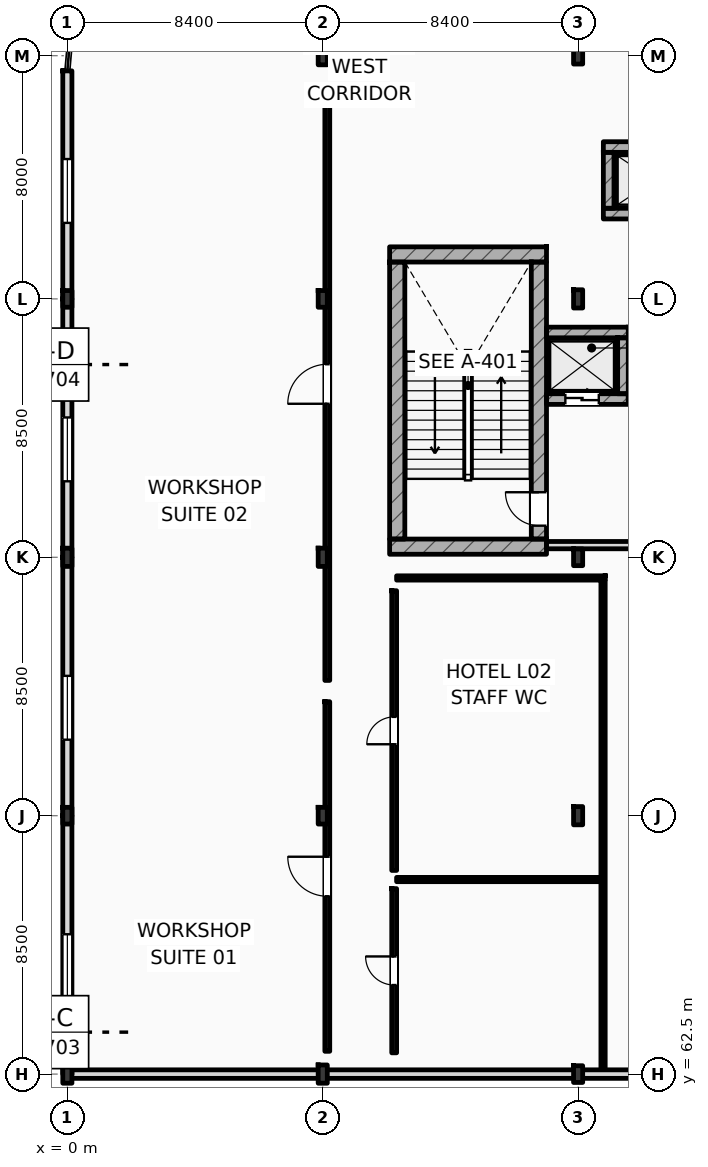
"""IFC4 building model, lengths in metres.
Left out: names, types, materials, properties, quantities, classifications, styles, units other than length and angle.
Written with IfcOpenShell. Run it as: python <this file> out.ifc"""

import sys

from ifc_helpers import new_model, si_unit, direction, frame, frame_2d, origin, origin_2d, place, context, subcontext, project, spatial, rectangle, i_section, extrude, element, fill, save


model = new_model("IFC4")
c1 = context("Model", 3, precision=1e-05, world=origin(), true_north=direction((0.0, 1.0)))
c2 = subcontext(c1, "Body", "Model", "MODEL_VIEW")
j1 = project(units=[si_unit("LENGTHUNIT", "METRE"), si_unit("PLANEANGLEUNIT", "RADIAN")], contexts=[c1])
p1 = place(None, origin())
s1 = spatial("IfcSite", under=j1, at=p1, CompositionType="ELEMENT")
p2 = place(p1, origin())
s2 = spatial("IfcBuilding", under=s1, at=p2, CompositionType="ELEMENT")
p3 = place(p2, frame((0.0, 0.0, 11.4)))
s3 = spatial("IfcBuildingStorey", under=s2, at=p3, CompositionType="ELEMENT", Elevation=11.4)
p4 = place(p3, frame((0.0, 62.5, 0.0), z_axis=(0.0, 0.0, 1.0), x_axis=(1.0, 0.0, 0.0)))
e1 = element("IfcColumn", 1, at=p4, inside=s3, PredefinedType="COLUMN", context=c2, shape_type="SweptSolid", body=[
    extrude(i_section(OverallWidth=0.3, OverallDepth=0.6, WebThickness=0.015, FlangeThickness=0.03, FilletRadius=0.027, at=origin_2d()), origin(), (0.0, 0.0, 1.0), 4.8),
])
p5 = place(p3, frame((0.0, 71.0, 0.0), z_axis=(0.0, 0.0, 1.0), x_axis=(1.0, 0.0, 0.0)))
e2 = element("IfcColumn", 2, at=p5, inside=s3, PredefinedType="COLUMN", context=c2, shape_type="SweptSolid", body=[
    extrude(i_section(OverallWidth=0.3, OverallDepth=0.55, WebThickness=0.015, FlangeThickness=0.029, FilletRadius=0.027, at=origin_2d()), origin(), (0.0, 0.0, 1.0), 4.8),
])
p6 = place(p3, frame((0.0, 79.5, 0.0), z_axis=(0.0, 0.0, 1.0), x_axis=(1.0, 0.0, 0.0)))
e3 = element("IfcColumn", 3, at=p6, inside=s3, PredefinedType="COLUMN", context=c2, shape_type="SweptSolid", body=[
    extrude(i_section(OverallWidth=0.3, OverallDepth=0.6, WebThickness=0.015, FlangeThickness=0.03, FilletRadius=0.027, at=origin_2d()), origin(), (0.0, 0.0, 1.0), 4.8),
])
p7 = place(p3, frame((0.0, 88.0, 0.0), z_axis=(0.0, 0.0, 1.0), x_axis=(1.0, 0.0, 0.0)))
e4 = element("IfcColumn", 4, at=p7, inside=s3, PredefinedType="COLUMN", context=c2, shape_type="SweptSolid", body=[
    extrude(i_section(OverallWidth=0.3, OverallDepth=0.55, WebThickness=0.015, FlangeThickness=0.029, FilletRadius=0.027, at=origin_2d()), origin(), (0.0, 0.0, 1.0), 4.8),
])
p8 = place(p3, frame((8.4, 62.5, 0.0), z_axis=(0.0, 0.0, 1.0), x_axis=(1.0, 0.0, 0.0)))
e5 = element("IfcColumn", 5, at=p8, inside=s3, PredefinedType="COLUMN", context=c2, shape_type="SweptSolid", body=[
    extrude(i_section(OverallWidth=0.3, OverallDepth=0.6, WebThickness=0.015, FlangeThickness=0.03, FilletRadius=0.027, at=origin_2d()), origin(), (0.0, 0.0, 1.0), 4.8),
])
p9 = place(p3, frame((8.4, 71.0, 0.0), z_axis=(0.0, 0.0, 1.0), x_axis=(1.0, 0.0, 0.0)))
e6 = element("IfcColumn", 6, at=p9, inside=s3, PredefinedType="COLUMN", context=c2, shape_type="SweptSolid", body=[
    extrude(i_section(OverallWidth=0.3, OverallDepth=0.55, WebThickness=0.015, FlangeThickness=0.029, FilletRadius=0.027, at=origin_2d()), origin(), (0.0, 0.0, 1.0), 4.8),
])
p10 = place(p3, frame((8.4, 79.5, 0.0), z_axis=(0.0, 0.0, 1.0), x_axis=(1.0, 0.0, 0.0)))
e7 = element("IfcColumn", 7, at=p10, inside=s3, PredefinedType="COLUMN", context=c2, shape_type="SweptSolid", body=[
    extrude(i_section(OverallWidth=0.3, OverallDepth=0.6, WebThickness=0.015, FlangeThickness=0.03, FilletRadius=0.027, at=origin_2d()), origin(), (0.0, 0.0, 1.0), 4.8),
])
p11 = place(p3, frame((8.4, 88.0, 0.0), z_axis=(0.0, 0.0, 1.0), x_axis=(1.0, 0.0, 0.0)))
e8 = element("IfcColumn", 8, at=p11, inside=s3, PredefinedType="COLUMN", context=c2, shape_type="SweptSolid", body=[
    extrude(i_section(OverallWidth=0.3, OverallDepth=0.55, WebThickness=0.015, FlangeThickness=0.029, FilletRadius=0.027, at=origin_2d()), origin(), (0.0, 0.0, 1.0), 4.8),
])
p12 = place(p3, frame((8.4, 96.0, 0.0), z_axis=(0.0, 0.0, 1.0), x_axis=(1.0, 0.0, 0.0)))
e9 = element("IfcColumn", 9, at=p12, inside=s3, PredefinedType="COLUMN", context=c2, shape_type="SweptSolid", body=[
    extrude(i_section(OverallWidth=0.3, OverallDepth=0.6, WebThickness=0.015, FlangeThickness=0.03, FilletRadius=0.027, at=origin_2d()), origin(), (0.0, 0.0, 1.0), 4.8),
])
p13 = place(p3, frame((16.8, 62.5, 0.0), z_axis=(0.0, 0.0, 1.0), x_axis=(1.0, 0.0, 0.0)))
e10 = element("IfcColumn", 10, at=p13, inside=s3, PredefinedType="COLUMN", context=c2, shape_type="SweptSolid", body=[
    extrude(i_section(OverallWidth=0.3, OverallDepth=0.55, WebThickness=0.015, FlangeThickness=0.029, FilletRadius=0.027, at=origin_2d()), origin(), (0.0, 0.0, 1.0), 4.8),
])
p14 = place(p3, frame((16.8, 71.0, 0.0), z_axis=(0.0, 0.0, 1.0), x_axis=(1.0, 0.0, 0.0)))
e11 = element("IfcColumn", 11, at=p14, inside=s3, PredefinedType="COLUMN", context=c2, shape_type="SweptSolid", body=[
    extrude(i_section(OverallWidth=0.3, OverallDepth=0.6, WebThickness=0.015, FlangeThickness=0.03, FilletRadius=0.027, at=origin_2d()), origin(), (0.0, 0.0, 1.0), 4.8),
])
p15 = place(p3, frame((16.8, 79.5, 0.0), z_axis=(0.0, 0.0, 1.0), x_axis=(1.0, 0.0, 0.0)))
e12 = element("IfcColumn", 12, at=p15, inside=s3, PredefinedType="COLUMN", context=c2, shape_type="SweptSolid", body=[
    extrude(i_section(OverallWidth=0.3, OverallDepth=0.55, WebThickness=0.015, FlangeThickness=0.029, FilletRadius=0.027, at=origin_2d()), origin(), (0.0, 0.0, 1.0), 4.8),
])
p16 = place(p3, frame((16.8, 88.0, 0.0), z_axis=(0.0, 0.0, 1.0), x_axis=(1.0, 0.0, 0.0)))
e13 = element("IfcColumn", 13, at=p16, inside=s3, PredefinedType="COLUMN", context=c2, shape_type="SweptSolid", body=[
    extrude(i_section(OverallWidth=0.3, OverallDepth=0.6, WebThickness=0.015, FlangeThickness=0.03, FilletRadius=0.027, at=origin_2d()), origin(), (0.0, 0.0, 1.0), 4.8),
])
p17 = place(p3, frame((16.8, 96.0, 0.0), z_axis=(0.0, 0.0, 1.0), x_axis=(1.0, 0.0, 0.0)))
e14 = element("IfcColumn", 14, at=p17, inside=s3, PredefinedType="COLUMN", context=c2, shape_type="SweptSolid", body=[
    extrude(i_section(OverallWidth=0.3, OverallDepth=0.55, WebThickness=0.015, FlangeThickness=0.029, FilletRadius=0.027, at=origin_2d()), origin(), (0.0, 0.0, 1.0), 4.8),
])
for number, where, z_axis, x_axis in (
    (15, (10.6, 89.462, 0.0), (0.0, 0.0, 1.0), (1.0, 0.0, 0.0)),
    (16, (10.6, 79.85, 0.0), (0.0, 0.0, 1.0), (1.0, 0.0, 0.0)),
):
    element("IfcWall", number, at=place(p3, frame(where, z_axis=z_axis, x_axis=x_axis)), inside=s3, PredefinedType="SHEAR", context=c2, shape_type="SweptSolid", body=[
        extrude(rectangle(XDim=5.16, YDim=0.5, at=frame_2d((2.58, 0.0))), origin(), (0.0, 0.0, 1.0), 4.8),
    ])
p18 = place(p3, frame((10.85, 80.1, 0.0), z_axis=(0.0, 0.0, 1.0), x_axis=(0.0, 1.0, 0.0)))
e17 = element("IfcWall", 17, at=p18, inside=s3, PredefinedType="SHEAR", context=c2, shape_type="SweptSolid", body=[
    extrude(rectangle(XDim=9.112, YDim=0.5, at=frame_2d((4.556, 0.0))), origin(), (0.0, 0.0, 1.0), 4.8),
])
p19 = place(p3, frame((15.51, 80.1, 0.0), z_axis=(0.0, 0.0, 1.0), x_axis=(0.0, 1.0, 0.0)))
e18 = element("IfcWall", 18, at=p19, inside=s3, PredefinedType="SHEAR", context=c2, shape_type="SweptSolid", body=[
    extrude(rectangle(XDim=9.112, YDim=0.5, at=frame_2d((4.556, 0.0))), origin(), (0.0, 0.0, 1.0), 4.8),
])
p20 = place(p19, frame((0.44, 0.0, 0.0)))
e19 = element("IfcOpeningElement", 19, at=p20, cuts=e18, PredefinedType="OPENING", context=c2, shape_type="SweptSolid", body=[
    extrude(rectangle(XDim=1.1, YDim=2.2, at=frame_2d((0.55, 1.1))), frame((0.0, 0.26, 0.0), z_axis=(0.0, -1.0, 0.0), x_axis=(1.0, 0.0, 0.0)), (0.0, 0.0, 1.0), 0.52),
])
p21 = place(p3, frame((0.0, 62.5, 0.0), z_axis=(0.0, 0.0, 1.0), x_axis=(0.0, 1.0, 0.0)))
e20 = element("IfcWall", 20, at=p21, inside=s3, PredefinedType="STANDARD", context=c2, shape_type="SweptSolid", body=[
    extrude(rectangle(XDim=8.5, YDim=0.3, at=frame_2d((4.25, 0.0))), origin(), (0.0, 0.0, 1.0), 4.11),
])
p22 = place(p21, frame((2.5, 0.0, 0.95)))
e21 = element("IfcOpeningElement", 21, at=p22, cuts=e20, PredefinedType="OPENING", context=c2, shape_type="SweptSolid", body=[
    extrude(rectangle(XDim=2.1, YDim=2.2, at=frame_2d((1.05, 1.1))), frame((0.0, 0.16, 0.0), z_axis=(0.0, -1.0, 0.0), x_axis=(1.0, 0.0, 0.0)), (0.0, 0.0, 1.0), 0.32),
])
p23 = place(p3, frame((0.0, 71.0, 0.0), z_axis=(0.0, 0.0, 1.0), x_axis=(0.0, 1.0, 0.0)))
e22 = element("IfcWall", 22, at=p23, inside=s3, PredefinedType="STANDARD", context=c2, shape_type="SweptSolid", body=[
    extrude(rectangle(XDim=8.5, YDim=0.3, at=frame_2d((4.25, 0.0))), origin(), (0.0, 0.0, 1.0), 4.11),
])
p24 = place(p23, frame((2.5, 0.0, 0.95)))
e23 = element("IfcOpeningElement", 23, at=p24, cuts=e22, PredefinedType="OPENING", context=c2, shape_type="SweptSolid", body=[
    extrude(rectangle(XDim=2.1, YDim=2.2, at=frame_2d((1.05, 1.1))), frame((0.0, 0.16, 0.0), z_axis=(0.0, -1.0, 0.0), x_axis=(1.0, 0.0, 0.0)), (0.0, 0.0, 1.0), 0.32),
])
p25 = place(p3, frame((0.0, 79.5, 0.0), z_axis=(0.0, 0.0, 1.0), x_axis=(0.0, 1.0, 0.0)))
e24 = element("IfcWall", 24, at=p25, inside=s3, PredefinedType="STANDARD", context=c2, shape_type="SweptSolid", body=[
    extrude(rectangle(XDim=8.5, YDim=0.3, at=frame_2d((4.25, 0.0))), origin(), (0.0, 0.0, 1.0), 4.11),
])
p26 = place(p25, frame((2.5, 0.0, 0.95)))
e25 = element("IfcOpeningElement", 25, at=p26, cuts=e24, PredefinedType="OPENING", context=c2, shape_type="SweptSolid", body=[
    extrude(rectangle(XDim=2.1, YDim=2.2, at=frame_2d((1.05, 1.1))), frame((0.0, 0.16, 0.0), z_axis=(0.0, -1.0, 0.0), x_axis=(1.0, 0.0, 0.0)), (0.0, 0.0, 1.0), 0.32),
])
p27 = place(p3, frame((0.0, 88.0, 0.0), z_axis=(0.0, 0.0, 1.0), x_axis=(0.0, 1.0, 0.0)))
e26 = element("IfcWall", 26, at=p27, inside=s3, PredefinedType="STANDARD", context=c2, shape_type="SweptSolid", body=[
    extrude(rectangle(XDim=7.5, YDim=0.3, at=frame_2d((3.75, 0.0))), origin(), (0.0, 0.0, 1.0), 4.52),
])
p28 = place(p27, frame((2.5, 0.0, 0.95)))
e27 = element("IfcOpeningElement", 27, at=p28, cuts=e26, PredefinedType="OPENING", context=c2, shape_type="SweptSolid", body=[
    extrude(rectangle(XDim=2.1, YDim=2.2, at=frame_2d((1.05, 1.1))), frame((0.0, 0.16, 0.0), z_axis=(0.0, -1.0, 0.0), x_axis=(1.0, 0.0, 0.0)), (0.0, 0.0, 1.0), 0.32),
])
p29 = place(p3, frame((0.0, 62.5, 0.0), z_axis=(0.0, 0.0, 1.0), x_axis=(1.0, 0.0, 0.0)))
e28 = element("IfcWall", 28, at=p29, inside=s3, PredefinedType="STANDARD", context=c2, shape_type="SweptSolid", body=[
    extrude(rectangle(XDim=25.2, YDim=0.28, at=frame_2d((12.6, 0.0))), origin(), (0.0, 0.0, 1.0), 3.96),
])
p30 = place(p3, frame((15.76, 86.895, 0.0), z_axis=(0.0, 0.0, 1.0), x_axis=(1.0, 0.0, 0.0)))
e29 = element("IfcWall", 29, at=p30, inside=s3, PredefinedType="SHEAR", context=c2, shape_type="SweptSolid", body=[
    extrude(rectangle(XDim=2.69, YDim=0.35, at=frame_2d((1.345, 0.0))), origin(), (0.0, 0.0, 1.0), 4.52),
])
p31 = place(p3, frame((15.76, 84.705, 0.0), z_axis=(0.0, 0.0, 1.0), x_axis=(1.0, 0.0, 0.0)))
e30 = element("IfcWall", 30, at=p31, inside=s3, PredefinedType="SHEAR", context=c2, shape_type="SweptSolid", body=[
    extrude(rectangle(XDim=2.69, YDim=0.35, at=frame_2d((1.345, 0.0))), origin(), (0.0, 0.0, 1.0), 4.52),
])
p32 = place(p31, frame((0.62, 0.0, 0.0)))
e31 = element("IfcOpeningElement", 31, at=p32, cuts=e30, PredefinedType="OPENING", context=c2, shape_type="SweptSolid", body=[
    extrude(rectangle(XDim=1.1, YDim=2.2, at=frame_2d((0.55, 1.1))), frame((0.0, 0.185, 0.0), z_axis=(0.0, -1.0, 0.0), x_axis=(1.0, 0.0, 0.0)), (0.0, 0.0, 1.0), 0.37),
])
p33 = place(p3, frame((18.275, 84.88, 0.0), z_axis=(0.0, 0.0, 1.0), x_axis=(0.0, 1.0, 0.0)))
e32 = element("IfcWall", 32, at=p33, inside=s3, PredefinedType="SHEAR", context=c2, shape_type="SweptSolid", body=[
    extrude(rectangle(XDim=1.84, YDim=0.35, at=frame_2d((0.92, 0.0))), origin(), (0.0, 0.0, 1.0), 4.52),
])
p34 = place(p3, frame((17.63, 92.995, 0.0), z_axis=(0.0, 0.0, 1.0), x_axis=(1.0, 0.0, 0.0)))
e33 = element("IfcWall", 33, at=p34, inside=s3, PredefinedType="SHEAR", context=c2, shape_type="SweptSolid", body=[
    extrude(rectangle(XDim=3.34, YDim=0.35, at=frame_2d((1.67, 0.0))), origin(), (0.0, 0.0, 1.0), 4.52),
])
p35 = place(p3, frame((17.63, 90.805, 0.0), z_axis=(0.0, 0.0, 1.0), x_axis=(1.0, 0.0, 0.0)))
e34 = element("IfcWall", 34, at=p35, inside=s3, PredefinedType="SHEAR", context=c2, shape_type="SweptSolid", body=[
    extrude(rectangle(XDim=3.34, YDim=0.35, at=frame_2d((1.67, 0.0))), origin(), (0.0, 0.0, 1.0), 4.52),
])
p36 = place(p35, frame((1.045, 0.0, 0.0)))
e35 = element("IfcOpeningElement", 35, at=p36, cuts=e34, PredefinedType="OPENING", context=c2, shape_type="SweptSolid", body=[
    extrude(rectangle(XDim=1.25, YDim=2.25, at=frame_2d((0.625, 1.125))), frame((0.0, 0.185, 0.0), z_axis=(0.0, -1.0, 0.0), x_axis=(1.0, 0.0, 0.0)), (0.0, 0.0, 1.0), 0.37),
])
p37 = place(p3, frame((17.805, 90.98, 0.0), z_axis=(0.0, 0.0, 1.0), x_axis=(0.0, 1.0, 0.0)))
e36 = element("IfcWall", 36, at=p37, inside=s3, PredefinedType="SHEAR", context=c2, shape_type="SweptSolid", body=[
    extrude(rectangle(XDim=1.84, YDim=0.35, at=frame_2d((0.92, 0.0))), origin(), (0.0, 0.0, 1.0), 4.52),
])
p38 = place(p3, frame((15.76, 79.9, 0.0), z_axis=(0.0, 0.0, 1.0), x_axis=(1.0, 0.0, 0.0)))
e37 = element("IfcWall", 37, at=p38, inside=s3, PredefinedType="STANDARD", context=c2, shape_type="SweptSolid", body=[
    extrude(rectangle(XDim=4.86, YDim=0.24, at=frame_2d((2.43, 0.0))), origin(), (0.0, 0.0, 1.0), 4.52),
])
p39 = place(p3, frame((8.55, 63.25, 0.0), z_axis=(0.0, 0.0, 1.0), x_axis=(0.0, 1.0, 0.0)))
e38 = element("IfcWall", 38, at=p39, inside=s3, PredefinedType="PARTITIONING", context=c2, shape_type="SweptSolid", body=[
    extrude(rectangle(XDim=11.5, YDim=0.16, at=frame_2d((5.75, 0.0))), origin(), (0.0, 0.0, 1.0), 4.11),
])
p40 = place(p39, frame((5.1, 0.0, 0.0)))
e39 = element("IfcOpeningElement", 39, at=p40, cuts=e38, PredefinedType="OPENING", context=c2, shape_type="SweptSolid", body=[
    extrude(rectangle(XDim=1.3, YDim=2.2, at=frame_2d((0.65, 1.1))), frame((0.0, 0.09, 0.0), z_axis=(0.0, -1.0, 0.0), x_axis=(1.0, 0.0, 0.0)), (0.0, 0.0, 1.0), 0.18),
])
p41 = place(p3, frame((8.55, 75.45, 0.0), z_axis=(0.0, 0.0, 1.0), x_axis=(0.0, 1.0, 0.0)))
e40 = element("IfcWall", 40, at=p41, inside=s3, PredefinedType="PARTITIONING", context=c2, shape_type="SweptSolid", body=[
    extrude(rectangle(XDim=19.5, YDim=0.16, at=frame_2d((9.75, 0.0))), origin(), (0.0, 0.0, 1.0), 4.11),
])
p42 = place(p41, frame((9.1, 0.0, 0.0)))
e41 = element("IfcOpeningElement", 41, at=p42, cuts=e40, PredefinedType="OPENING", context=c2, shape_type="SweptSolid", body=[
    extrude(rectangle(XDim=1.3, YDim=2.2, at=frame_2d((0.65, 1.1))), frame((0.0, 0.09, 0.0), z_axis=(0.0, -1.0, 0.0), x_axis=(1.0, 0.0, 0.0)), (0.0, 0.0, 1.0), 0.18),
])
p43 = place(p3, frame((10.75, 63.2, 0.0), z_axis=(0.0, 0.0, 1.0), x_axis=(0.0, 1.0, 0.0)))
e42 = element("IfcWall", 42, at=p43, inside=s3, PredefinedType="PARTITIONING", context=c2, shape_type="SweptSolid", body=[
    extrude(rectangle(XDim=5.4, YDim=0.16, at=frame_2d((2.7, 0.0))), origin(), (0.0, 0.0, 1.0), 4.52),
])
p44 = place(p43, frame((2.23, 0.0, 0.0)))
e43 = element("IfcOpeningElement", 43, at=p44, cuts=e42, PredefinedType="OPENING", context=c2, shape_type="SweptSolid", body=[
    extrude(rectangle(XDim=0.94, YDim=2.15, at=frame_2d((0.47, 1.075))), frame((0.0, 0.09, 0.0), z_axis=(0.0, -1.0, 0.0), x_axis=(1.0, 0.0, 0.0)), (0.0, 0.0, 1.0), 0.18),
])
p45 = place(p3, frame((10.75, 69.2, 0.0), z_axis=(0.0, 0.0, 1.0), x_axis=(0.0, 1.0, 0.0)))
e44 = element("IfcWall", 44, at=p45, inside=s3, PredefinedType="PARTITIONING", context=c2, shape_type="SweptSolid", body=[
    extrude(rectangle(XDim=9.2, YDim=0.16, at=frame_2d((4.6, 0.0))), origin(), (0.0, 0.0, 1.0), 4.52),
])
p46 = place(p45, frame((4.15, 0.0, 0.0)))
e45 = element("IfcOpeningElement", 45, at=p46, cuts=e44, PredefinedType="OPENING", context=c2, shape_type="SweptSolid", body=[
    extrude(rectangle(XDim=0.9, YDim=2.1, at=frame_2d((0.45, 1.05))), frame((0.0, 0.09, 0.0), z_axis=(0.0, -1.0, 0.0), x_axis=(1.0, 0.0, 0.0)), (0.0, 0.0, 1.0), 0.18),
])
p47 = place(p3, frame((10.83, 68.9, 0.0), z_axis=(0.0, 0.0, 1.0), x_axis=(1.0, 0.0, 0.0)))
e46 = element("IfcWall", 46, at=p47, inside=s3, PredefinedType="PARTITIONING", context=c2, shape_type="SweptSolid", body=[
    extrude(rectangle(XDim=6.72, YDim=0.14, at=frame_2d((3.36, 0.0))), origin(), (0.0, 0.0, 1.0), 4.52),
])
p48 = place(p3, frame((17.62, 62.7, 0.0), z_axis=(0.0, 0.0, 1.0), x_axis=(0.0, 1.0, 0.0)))
e47 = element("IfcWall", 47, at=p48, inside=s3, PredefinedType="PARTITIONING", context=c2, shape_type="SweptSolid", body=[
    extrude(rectangle(XDim=16.05, YDim=0.14, at=frame_2d((8.025, 0.0))), origin(), (0.0, 0.0, 1.0), 4.52),
])
p49 = place(p3, frame((10.83, 78.82, 0.0), z_axis=(0.0, 0.0, 1.0), x_axis=(1.0, 0.0, 0.0)))
e48 = element("IfcWall", 48, at=p49, inside=s3, PredefinedType="PARTITIONING", context=c2, shape_type="SweptSolid", body=[
    extrude(rectangle(XDim=6.86, YDim=0.14, at=frame_2d((3.43, 0.0))), origin(), (0.0, 0.0, 1.0), 4.52),
])
p50 = place(p22, origin())
e49 = element("IfcWindow", 49, at=p50, inside=s3, PartitioningType="DOUBLE_PANEL_VERTICAL", PredefinedType="WINDOW", context=c2, shape_type="SweptSolid", body=[
    extrude(rectangle(XDim=2.1, YDim=2.2, at=frame_2d((1.05, 1.1))), frame((0.0, 0.03, 0.0), z_axis=(0.0, -1.0, 0.0), x_axis=(1.0, 0.0, 0.0)), (0.0, 0.0, 1.0), 0.06),
])
fill(e21, e49)
p51 = place(p24, origin())
e50 = element("IfcWindow", 50, at=p51, inside=s3, PartitioningType="DOUBLE_PANEL_VERTICAL", PredefinedType="WINDOW", context=c2, shape_type="SweptSolid", body=[
    extrude(rectangle(XDim=2.1, YDim=2.2, at=frame_2d((1.05, 1.1))), frame((0.0, 0.03, 0.0), z_axis=(0.0, -1.0, 0.0), x_axis=(1.0, 0.0, 0.0)), (0.0, 0.0, 1.0), 0.06),
])
fill(e23, e50)
p52 = place(p26, origin())
e51 = element("IfcWindow", 51, at=p52, inside=s3, PartitioningType="DOUBLE_PANEL_VERTICAL", PredefinedType="WINDOW", context=c2, shape_type="SweptSolid", body=[
    extrude(rectangle(XDim=2.1, YDim=2.2, at=frame_2d((1.05, 1.1))), frame((0.0, 0.03, 0.0), z_axis=(0.0, -1.0, 0.0), x_axis=(1.0, 0.0, 0.0)), (0.0, 0.0, 1.0), 0.06),
])
fill(e25, e51)
p53 = place(p28, origin())
e52 = element("IfcWindow", 52, at=p53, inside=s3, PartitioningType="DOUBLE_PANEL_VERTICAL", PredefinedType="WINDOW", context=c2, shape_type="SweptSolid", body=[
    extrude(rectangle(XDim=2.1, YDim=2.2, at=frame_2d((1.05, 1.1))), frame((0.0, 0.03, 0.0), z_axis=(0.0, -1.0, 0.0), x_axis=(1.0, 0.0, 0.0)), (0.0, 0.0, 1.0), 0.06),
])
fill(e27, e52)
p54 = place(p20, origin())
e53 = element("IfcDoor", 53, at=p54, inside=s3, OperationType="SINGLE_SWING_RIGHT", PredefinedType="DOOR", context=c2, shape_type="SweptSolid", body=[
    extrude(rectangle(XDim=1.1, YDim=2.2, at=frame_2d((0.55, 1.1))), frame((0.0, 0.025, 0.0), z_axis=(0.0, -1.0, 0.0), x_axis=(1.0, 0.0, 0.0)), (0.0, 0.0, 1.0), 0.05),
])
fill(e19, e53)
p55 = place(p32, origin())
e54 = element("IfcDoor", 54, at=p55, inside=s3, OperationType="SLIDING_TO_LEFT", PredefinedType="DOOR", context=c2, shape_type="SweptSolid", body=[
    extrude(rectangle(XDim=1.1, YDim=2.2, at=frame_2d((0.55, 1.1))), frame((0.0, 0.025, 0.0), z_axis=(0.0, -1.0, 0.0), x_axis=(1.0, 0.0, 0.0)), (0.0, 0.0, 1.0), 0.05),
])
fill(e31, e54)
p56 = place(p40, origin())
e55 = element("IfcDoor", 55, at=p56, inside=s3, OperationType="SINGLE_SWING_RIGHT", PredefinedType="DOOR", context=c2, shape_type="SweptSolid", body=[
    extrude(rectangle(XDim=1.3, YDim=2.2, at=frame_2d((0.65, 1.1))), frame((0.0, 0.025, 0.0), z_axis=(0.0, -1.0, 0.0), x_axis=(1.0, 0.0, 0.0)), (0.0, 0.0, 1.0), 0.05),
])
fill(e39, e55)
p57 = place(p42, origin())
e56 = element("IfcDoor", 56, at=p57, inside=s3, OperationType="SINGLE_SWING_LEFT", PredefinedType="DOOR", context=c2, shape_type="SweptSolid", body=[
    extrude(rectangle(XDim=1.3, YDim=2.2, at=frame_2d((0.65, 1.1))), frame((0.0, 0.025, 0.0), z_axis=(0.0, -1.0, 0.0), x_axis=(1.0, 0.0, 0.0)), (0.0, 0.0, 1.0), 0.05),
])
fill(e41, e56)
p58 = place(p44, origin())
e57 = element("IfcDoor", 57, at=p58, inside=s3, OperationType="SINGLE_SWING_RIGHT", PredefinedType="DOOR", context=c2, shape_type="SweptSolid", body=[
    extrude(rectangle(XDim=0.94, YDim=2.15, at=frame_2d((0.47, 1.075))), frame((0.0, 0.025, 0.0), z_axis=(0.0, -1.0, 0.0), x_axis=(1.0, 0.0, 0.0)), (0.0, 0.0, 1.0), 0.05),
])
fill(e43, e57)
p59 = place(p46, origin())
e58 = element("IfcDoor", 58, at=p59, inside=s3, OperationType="SINGLE_SWING_LEFT", PredefinedType="DOOR", context=c2, shape_type="SweptSolid", body=[
    extrude(rectangle(XDim=0.9, YDim=2.1, at=frame_2d((0.45, 1.05))), frame((0.0, 0.025, 0.0), z_axis=(0.0, -1.0, 0.0), x_axis=(1.0, 0.0, 0.0)), (0.0, 0.0, 1.0), 0.05),
])
fill(e45, e58)
save(model, sys.argv[1])
